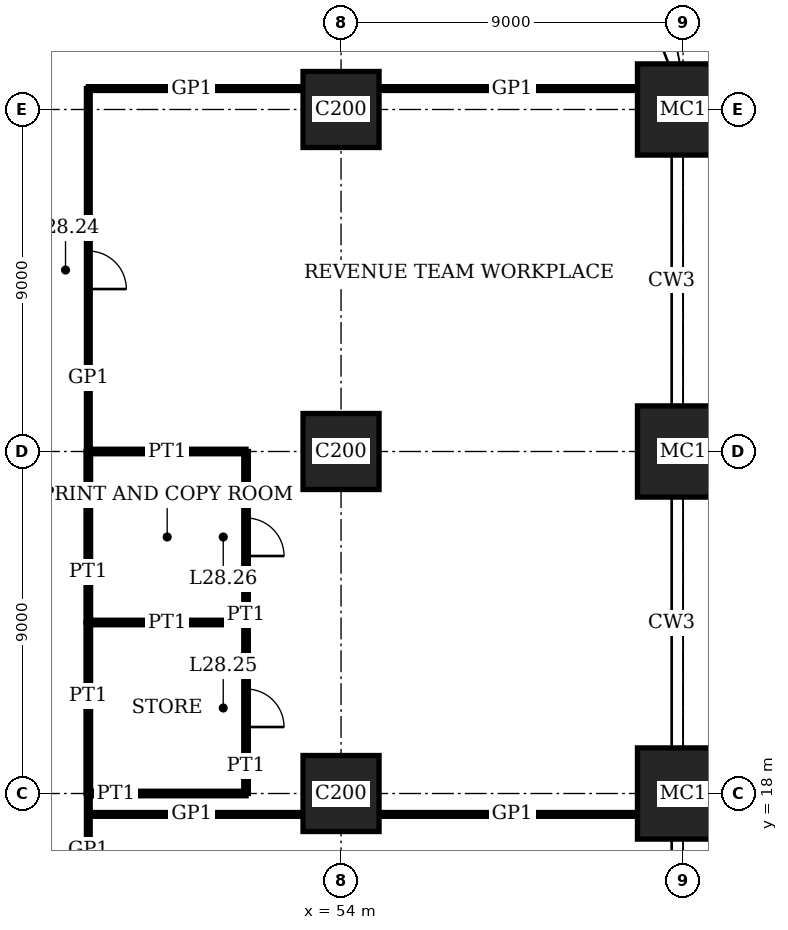
"""IFC4 building model, lengths in metres.
Left out: names, types, materials, properties, quantities, classifications, styles, units other than length and angle.
Written with IfcOpenShell. Run it as: python <this file> out.ifc"""

import sys

from ifc_helpers import new_model, si_unit, direction, frame, frame_2d, origin, origin_2d, place, context, subcontext, project, spatial, rectangle, extrude, element, fill, save


model = new_model("IFC4")
c1 = context("Model", 3, precision=1e-05, world=origin(), true_north=direction((0.0, 1.0)))
c2 = subcontext(c1, "Body", "Model", "MODEL_VIEW")
j1 = project(units=[si_unit("LENGTHUNIT", "METRE"), si_unit("PLANEANGLEUNIT", "RADIAN")], contexts=[c1])
p1 = place(None, origin())
s1 = spatial("IfcSite", under=j1, at=p1, CompositionType="ELEMENT")
p2 = place(p1, origin())
s2 = spatial("IfcBuilding", under=s1, at=p2, CompositionType="ELEMENT")
p3 = place(p2, frame((0.0, 0.0, 117.0)))
s3 = spatial("IfcBuildingStorey", under=s2, at=p3, CompositionType="ELEMENT", Elevation=117.0)
for number, where, z_axis, x_axis in (
    (1, (54.0, 18.0, 0.0), (0.0, 0.0, 1.0), (1.0, 0.0, 0.0)),
    (2, (54.0, 27.0, 0.0), (0.0, 0.0, 1.0), (1.0, 0.0, 0.0)),
    (3, (54.0, 36.0, 0.0), (0.0, 0.0, 1.0), (1.0, 0.0, 0.0)),
):
    element("IfcColumn", number, at=place(p3, frame(where, z_axis=z_axis, x_axis=x_axis)), inside=s3, PredefinedType="COLUMN", context=c2, shape_type="SweptSolid", body=[
        extrude(rectangle(XDim=2.0, YDim=2.0, at=origin_2d()), origin(), (0.0, 0.0, 1.0), 4.0),
    ])
for number, where, z_axis, x_axis in (
    (4, (63.0, 18.0, 0.0), (0.0, 0.0, 1.0), (1.0, 0.0, 0.0)),
    (5, (63.0, 27.0, 0.0), (0.0, 0.0, 1.0), (1.0, 0.0, 0.0)),
    (6, (63.0, 36.0, 0.0), (0.0, 0.0, 1.0), (1.0, 0.0, 0.0)),
):
    element("IfcColumn", number, at=place(p3, frame(where, z_axis=z_axis, x_axis=x_axis)), inside=s3, PredefinedType="COLUMN", context=c2, shape_type="SweptSolid", body=[
        extrude(rectangle(XDim=2.4, YDim=2.4, at=origin_2d()), origin(), (0.0, 0.0, 1.0), 4.0),
    ])
p4 = place(p3, frame((47.35, 17.45, 0.0), z_axis=(0.0, 0.0, 1.0), x_axis=(1.0, 0.0, 0.0)))
e7 = element("IfcWall", 7, at=p4, inside=s3, PredefinedType="PARTITIONING", context=c2, shape_type="SweptSolid", body=[
    extrude(rectangle(XDim=5.65, YDim=0.1, at=frame_2d((2.825, 0.0))), origin(), (0.0, 0.0, 1.0), 3.75),
])
p5 = place(p3, frame((55.0, 17.45, 0.0), z_axis=(0.0, 0.0, 1.0), x_axis=(1.0, 0.0, 0.0)))
e8 = element("IfcWall", 8, at=p5, inside=s3, PredefinedType="PARTITIONING", context=c2, shape_type="SweptSolid", body=[
    extrude(rectangle(XDim=6.8, YDim=0.1, at=frame_2d((3.4, 0.0))), origin(), (0.0, 0.0, 1.0), 3.75),
])
p6 = place(p3, frame((47.35, 18.0, 0.0), z_axis=(0.0, 0.0, 1.0), x_axis=(1.0, 0.0, 0.0)))
e9 = element("IfcWall", 9, at=p6, inside=s3, PredefinedType="PARTITIONING", context=c2, shape_type="SweptSolid", body=[
    extrude(rectangle(XDim=4.15, YDim=0.12, at=frame_2d((2.075, 0.0))), origin(), (0.0, 0.0, 1.0), 3.05),
])
p7 = place(p3, frame((47.35, 22.5, 0.0), z_axis=(0.0, 0.0, 1.0), x_axis=(1.0, 0.0, 0.0)))
e10 = element("IfcWall", 10, at=p7, inside=s3, PredefinedType="PARTITIONING", context=c2, shape_type="SweptSolid", body=[
    extrude(rectangle(XDim=4.15, YDim=0.12, at=frame_2d((2.075, 0.0))), origin(), (0.0, 0.0, 1.0), 3.1),
])
p8 = place(p3, frame((47.35, 27.0, 0.0), z_axis=(0.0, 0.0, 1.0), x_axis=(1.0, 0.0, 0.0)))
e11 = element("IfcWall", 11, at=p8, inside=s3, PredefinedType="PARTITIONING", context=c2, shape_type="SweptSolid", body=[
    extrude(rectangle(XDim=4.15, YDim=0.12, at=frame_2d((2.075, 0.0))), origin(), (0.0, 0.0, 1.0), 3.05),
])
p9 = place(p3, frame((47.35, 36.55, 0.0), z_axis=(0.0, 0.0, 1.0), x_axis=(1.0, 0.0, 0.0)))
e12 = element("IfcWall", 12, at=p9, inside=s3, PredefinedType="PARTITIONING", context=c2, shape_type="SweptSolid", body=[
    extrude(rectangle(XDim=5.65, YDim=0.1, at=frame_2d((2.825, 0.0))), origin(), (0.0, 0.0, 1.0), 3.75),
])
p10 = place(p3, frame((55.0, 36.55, 0.0), z_axis=(0.0, 0.0, 1.0), x_axis=(1.0, 0.0, 0.0)))
e13 = element("IfcWall", 13, at=p10, inside=s3, PredefinedType="PARTITIONING", context=c2, shape_type="SweptSolid", body=[
    extrude(rectangle(XDim=6.8, YDim=0.1, at=frame_2d((3.4, 0.0))), origin(), (0.0, 0.0, 1.0), 3.75),
])
for number, where, z_axis, x_axis in (
    (14, (47.35, 18.0, 0.0), (0.0, 0.0, 1.0), (0.0, 1.0, 0.0)),
    (15, (47.35, 22.5, 0.0), (0.0, 0.0, 1.0), (0.0, 1.0, 0.0)),
):
    element("IfcWall", number, at=place(p3, frame(where, z_axis=z_axis, x_axis=x_axis)), inside=s3, PredefinedType="PARTITIONING", context=c2, shape_type="SweptSolid", body=[
        extrude(rectangle(XDim=4.5, YDim=0.12, at=frame_2d((2.25, 0.0))), origin(), (0.0, 0.0, 1.0), 3.75),
    ])
p11 = place(p3, frame((47.35, 15.65, 0.0), z_axis=(0.0, 0.0, 1.0), x_axis=(0.0, 1.0, 0.0)))
e16 = element("IfcWall", 16, at=p11, inside=s3, PredefinedType="PARTITIONING", context=c2, shape_type="SweptSolid", body=[
    extrude(rectangle(XDim=2.35, YDim=0.1, at=frame_2d((1.175, 0.0))), origin(), (0.0, 0.0, 1.0), 3.75),
])
p12 = place(p3, frame((47.35, 27.0, 0.0), z_axis=(0.0, 0.0, 1.0), x_axis=(0.0, 1.0, 0.0)))
e17 = element("IfcWall", 17, at=p12, inside=s3, PredefinedType="PARTITIONING", context=c2, shape_type="SweptSolid", body=[
    extrude(rectangle(XDim=9.55, YDim=0.1, at=frame_2d((4.775, 0.0))), origin(), (0.0, 0.0, 1.0), 3.75),
])
p13 = place(p12, frame((4.275, 0.0, 0.0)))
e18 = element("IfcOpeningElement", 18, at=p13, cuts=e17, PredefinedType="OPENING", context=c2, shape_type="SweptSolid", body=[
    extrude(rectangle(XDim=1.0, YDim=2.4, at=frame_2d((0.5, 1.2))), frame((0.0, 0.06, 0.0), z_axis=(0.0, -1.0, 0.0), x_axis=(1.0, 0.0, 0.0)), (0.0, 0.0, 1.0), 0.12),
])
p14 = place(p3, frame((51.5, 18.0, 0.0), z_axis=(0.0, 0.0, 1.0), x_axis=(0.0, 1.0, 0.0)))
e19 = element("IfcWall", 19, at=p14, inside=s3, PredefinedType="PARTITIONING", context=c2, shape_type="SweptSolid", body=[
    extrude(rectangle(XDim=4.5, YDim=0.12, at=frame_2d((2.25, 0.0))), origin(), (0.0, 0.0, 1.0), 3.75),
])
p15 = place(p14, frame((1.75, 0.0, 0.0)))
e20 = element("IfcOpeningElement", 20, at=p15, cuts=e19, PredefinedType="OPENING", context=c2, shape_type="SweptSolid", body=[
    extrude(rectangle(XDim=1.0, YDim=2.4, at=frame_2d((0.5, 1.2))), frame((0.0, 0.07, 0.0), z_axis=(0.0, -1.0, 0.0), x_axis=(1.0, 0.0, 0.0)), (0.0, 0.0, 1.0), 0.14),
])
p16 = place(p3, frame((51.5, 22.5, 0.0), z_axis=(0.0, 0.0, 1.0), x_axis=(0.0, 1.0, 0.0)))
e21 = element("IfcWall", 21, at=p16, inside=s3, PredefinedType="PARTITIONING", context=c2, shape_type="SweptSolid", body=[
    extrude(rectangle(XDim=4.5, YDim=0.12, at=frame_2d((2.25, 0.0))), origin(), (0.0, 0.0, 1.0), 3.75),
])
p17 = place(p16, frame((1.75, 0.0, 0.0)))
e22 = element("IfcOpeningElement", 22, at=p17, cuts=e21, PredefinedType="OPENING", context=c2, shape_type="SweptSolid", body=[
    extrude(rectangle(XDim=1.0, YDim=2.4, at=frame_2d((0.5, 1.2))), frame((0.0, 0.07, 0.0), z_axis=(0.0, -1.0, 0.0), x_axis=(1.0, 0.0, 0.0)), (0.0, 0.0, 1.0), 0.14),
])
p18 = place(p13, origin())
e23 = element("IfcDoor", 23, at=p18, inside=s3, OperationType="SINGLE_SWING_LEFT", PredefinedType="DOOR", context=c2, shape_type="SweptSolid", body=[
    extrude(rectangle(XDim=1.0, YDim=2.4, at=frame_2d((0.5, 1.2))), frame((0.0, 0.02, 0.0), z_axis=(0.0, -1.0, 0.0), x_axis=(1.0, 0.0, 0.0)), (0.0, 0.0, 1.0), 0.04),
])
fill(e18, e23)
p19 = place(p15, origin())
e24 = element("IfcDoor", 24, at=p19, inside=s3, OperationType="SINGLE_SWING_LEFT", PredefinedType="DOOR", context=c2, shape_type="SweptSolid", body=[
    extrude(rectangle(XDim=1.0, YDim=2.4, at=frame_2d((0.5, 1.2))), frame((0.0, 0.025, 0.0), z_axis=(0.0, -1.0, 0.0), x_axis=(1.0, 0.0, 0.0)), (0.0, 0.0, 1.0), 0.05),
])
fill(e20, e24)
p20 = place(p17, origin())
e25 = element("IfcDoor", 25, at=p20, inside=s3, OperationType="SINGLE_SWING_LEFT", PredefinedType="DOOR", context=c2, shape_type="SweptSolid", body=[
    extrude(rectangle(XDim=1.0, YDim=2.4, at=frame_2d((0.5, 1.2))), frame((0.0, 0.025, 0.0), z_axis=(0.0, -1.0, 0.0), x_axis=(1.0, 0.0, 0.0)), (0.0, 0.0, 1.0), 0.05),
])
fill(e22, e25)
save(model, sys.argv[1])
